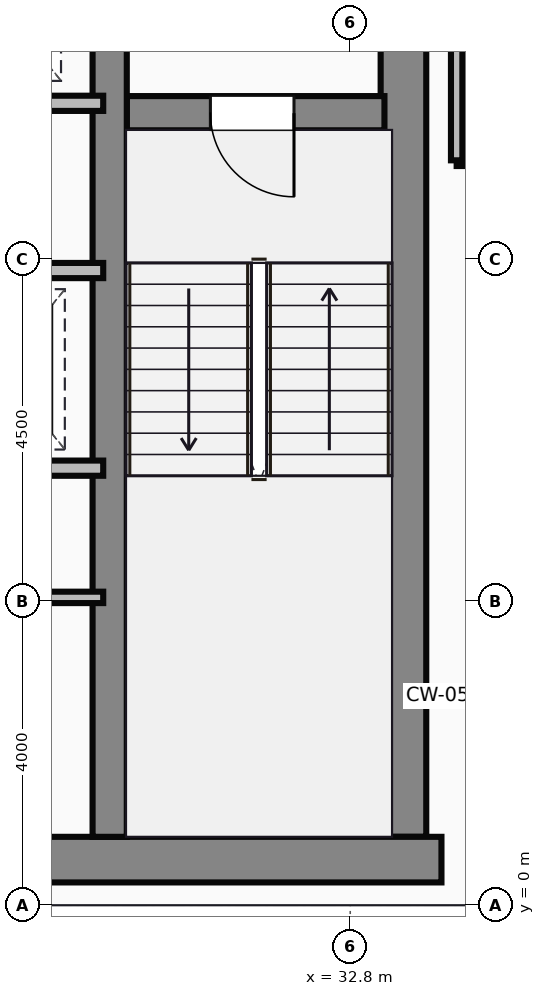
"""IFC4 building model, lengths in metres.
Left out: names, types, materials, properties, quantities, classifications, styles, units other than length and angle.
Written with IfcOpenShell. Run it as: python <this file> out.ifc"""

import sys

from ifc_helpers import new_model, si_unit, direction, frame, frame_2d, origin, place, context, subcontext, project, spatial, rectangle, extrude, source, transform, mapped, element, fill, save


model = new_model("IFC4")
c1 = context("Model", 3, precision=1e-05, world=origin(), true_north=direction((0.0, 1.0)))
c2 = subcontext(c1, "Body", "Model", "MODEL_VIEW")
j1 = project(units=[si_unit("LENGTHUNIT", "METRE"), si_unit("PLANEANGLEUNIT", "RADIAN")], contexts=[c1])
p1 = place(None, origin())
s1 = spatial("IfcSite", under=j1, at=p1, CompositionType="ELEMENT")
p2 = place(p1, origin())
s2 = spatial("IfcBuilding", under=s1, at=p2, CompositionType="ELEMENT")
p3 = place(p2, frame((0.0, 0.0, 244.2)))
s3 = spatial("IfcBuildingStorey", under=s2, at=p3, CompositionType="ELEMENT", Elevation=244.2)
m1 = source(origin(), c2, "Body", "SweptSolid", [
    extrude(rectangle(XDim=29.5, YDim=0.6, at=frame_2d((14.75, 0.0))), origin(), (0.0, 0.0, 1.0), 3.65),
])
p4 = place(p3, frame((4.5, 0.6, 0.0), z_axis=(0.0, 0.0, 1.0), x_axis=(1.0, 0.0, 0.0)))
e1 = element("IfcWall", 1, at=p4, inside=s3, PredefinedType="SHEAR", context=c2, shape_type="MappedRepresentation", body=[
    mapped(m1, transform((0.0, 0.0, 0.0))),
])
m2 = source(origin(), c2, "Body", "SweptSolid", [
    extrude(rectangle(XDim=13.1, YDim=0.6, at=frame_2d((6.55, 0.0))), origin(), (0.0, 0.0, 1.0), 3.65),
])
p5 = place(p3, frame((33.5, 0.9, 0.0), z_axis=(0.0, 0.0, 1.0), x_axis=(0.0, 1.0, 0.0)))
e2 = element("IfcWall", 2, at=p5, inside=s3, PredefinedType="SHEAR", context=c2, shape_type="MappedRepresentation", body=[
    mapped(m2, transform((0.0, 0.0, 0.0))),
])
m3 = source(origin(), c2, "Body", "SweptSolid", [
    extrude(rectangle(XDim=12.5, YDim=0.45, at=frame_2d((6.25, 0.0))), origin(), (0.0, 0.0, 1.0), 3.65),
])
p6 = place(p3, frame((29.635, 0.9, 0.0), z_axis=(0.0, 0.0, 1.0), x_axis=(0.0, 1.0, 0.0)))
e3 = element("IfcWall", 3, at=p6, inside=s3, PredefinedType="SHEAR", context=c2, shape_type="MappedRepresentation", body=[
    mapped(m3, transform((0.0, 0.0, 0.0))),
])
m4 = source(origin(), c2, "Body", "SweptSolid", [
    extrude(rectangle(XDim=3.39, YDim=0.45, at=frame_2d((1.695, 0.0))), origin(), (0.0, 0.0, 1.0), 3.65),
])
p7 = place(p3, frame((29.86, 10.42, 0.0), z_axis=(0.0, 0.0, 1.0), x_axis=(1.0, 0.0, 0.0)))
e4 = element("IfcWall", 4, at=p7, inside=s3, PredefinedType="SHEAR", context=c2, shape_type="MappedRepresentation", body=[
    mapped(m4, transform((0.0, 0.0, 0.0))),
])
p8 = place(p7, frame((1.1, 0.0, 0.0)))
e5 = element("IfcOpeningElement", 5, at=p8, cuts=e4, PredefinedType="OPENING", context=c2, shape_type="SweptSolid", body=[
    extrude(rectangle(XDim=1.1, YDim=2.15, at=frame_2d((0.55, 1.075))), frame((0.0, 0.235, 0.0), z_axis=(0.0, -1.0, 0.0), x_axis=(1.0, 0.0, 0.0)), (0.0, 0.0, 1.0), 0.47),
])
m5 = source(origin(), c2, "Body", "SweptSolid", [
    extrude(rectangle(XDim=8.8, YDim=0.2, at=frame_2d((4.4, 0.0))), origin(), (0.0, 0.0, 1.0), 3.4),
])
p9 = place(p3, frame((20.75, 10.55, 0.0), z_axis=(0.0, 0.0, 1.0), x_axis=(1.0, 0.0, 0.0)))
e6 = element("IfcWall", 6, at=p9, inside=s3, PredefinedType="PARTITIONING", context=c2, shape_type="MappedRepresentation", body=[
    mapped(m5, transform((0.0, 0.0, 0.0))),
])
p10 = place(p9, frame((0.5, 0.0, 0.0)))
e7 = element("IfcOpeningElement", 7, at=p10, cuts=e6, PredefinedType="OPENING", context=c2, shape_type="SweptSolid", body=[
    extrude(rectangle(XDim=1.05, YDim=2.15, at=frame_2d((0.525, 1.075))), frame((0.0, 0.11, 0.0), z_axis=(0.0, -1.0, 0.0), x_axis=(1.0, 0.0, 0.0)), (0.0, 0.0, 1.0), 0.22),
])
p11 = place(p9, frame((2.6, 0.0, 0.0)))
e8 = element("IfcOpeningElement", 8, at=p11, cuts=e6, PredefinedType="OPENING", context=c2, shape_type="SweptSolid", body=[
    extrude(rectangle(XDim=1.05, YDim=2.15, at=frame_2d((0.525, 1.075))), frame((0.0, 0.11, 0.0), z_axis=(0.0, -1.0, 0.0), x_axis=(1.0, 0.0, 0.0)), (0.0, 0.0, 1.0), 0.22),
])
p12 = place(p9, frame((4.7, 0.0, 0.0)))
e9 = element("IfcOpeningElement", 9, at=p12, cuts=e6, PredefinedType="OPENING", context=c2, shape_type="SweptSolid", body=[
    extrude(rectangle(XDim=1.05, YDim=2.15, at=frame_2d((0.525, 1.075))), frame((0.0, 0.11, 0.0), z_axis=(0.0, -1.0, 0.0), x_axis=(1.0, 0.0, 0.0)), (0.0, 0.0, 1.0), 0.22),
])
p13 = place(p9, frame((6.8, 0.0, 0.0)))
e10 = element("IfcOpeningElement", 10, at=p13, cuts=e6, PredefinedType="OPENING", context=c2, shape_type="SweptSolid", body=[
    extrude(rectangle(XDim=1.05, YDim=2.15, at=frame_2d((0.525, 1.075))), frame((0.0, 0.11, 0.0), z_axis=(0.0, -1.0, 0.0), x_axis=(1.0, 0.0, 0.0)), (0.0, 0.0, 1.0), 0.22),
])
m6 = source(origin(), c2, "Body", "SweptSolid", [
    extrude(rectangle(XDim=4.55, YDim=0.2, at=frame_2d((2.275, 0.0))), origin(), (0.0, 0.0, 1.0), 3.4),
])
p14 = place(p3, frame((25.0, 8.35, 0.0), z_axis=(0.0, 0.0, 1.0), x_axis=(1.0, 0.0, 0.0)))
e11 = element("IfcWall", 11, at=p14, inside=s3, PredefinedType="PARTITIONING", context=c2, shape_type="MappedRepresentation", body=[
    mapped(m6, transform((0.0, 0.0, 0.0))),
])
p15 = place(p14, frame((0.5, 0.0, 0.0)))
e12 = element("IfcOpeningElement", 12, at=p15, cuts=e11, PredefinedType="OPENING", context=c2, shape_type="SweptSolid", body=[
    extrude(rectangle(XDim=1.05, YDim=2.15, at=frame_2d((0.525, 1.075))), frame((0.0, 0.11, 0.0), z_axis=(0.0, -1.0, 0.0), x_axis=(1.0, 0.0, 0.0)), (0.0, 0.0, 1.0), 0.22),
])
p16 = place(p14, frame((2.6, 0.0, 0.0)))
e13 = element("IfcOpeningElement", 13, at=p16, cuts=e11, PredefinedType="OPENING", context=c2, shape_type="SweptSolid", body=[
    extrude(rectangle(XDim=1.05, YDim=2.15, at=frame_2d((0.525, 1.075))), frame((0.0, 0.11, 0.0), z_axis=(0.0, -1.0, 0.0), x_axis=(1.0, 0.0, 0.0)), (0.0, 0.0, 1.0), 0.22),
])
p17 = place(p3, frame((25.0, 5.75, 0.0), z_axis=(0.0, 0.0, 1.0), x_axis=(1.0, 0.0, 0.0)))
e14 = element("IfcWall", 14, at=p17, inside=s3, PredefinedType="PARTITIONING", context=c2, shape_type="MappedRepresentation", body=[
    mapped(m6, transform((0.0, 0.0, 0.0))),
])
m7 = source(origin(), c2, "Body", "SweptSolid", [
    extrude(rectangle(XDim=4.55, YDim=0.15, at=frame_2d((2.275, 0.0))), origin(), (0.0, 0.0, 1.0), 3.4),
])
p18 = place(p3, frame((25.0, 4.05, 0.0), z_axis=(0.0, 0.0, 1.0), x_axis=(1.0, 0.0, 0.0)))
e15 = element("IfcWall", 15, at=p18, inside=s3, PredefinedType="PARTITIONING", context=c2, shape_type="MappedRepresentation", body=[
    mapped(m7, transform((0.0, 0.0, 0.0))),
])
m8 = source(origin(), c2, "Body", "SweptSolid", [
    extrude(rectangle(XDim=4.8, YDim=0.15, at=frame_2d((2.4, 0.0))), origin(), (0.0, 0.0, 1.0), 3.4),
])
p19 = place(p3, frame((34.2, 9.8, 0.0), z_axis=(0.0, 0.0, 1.0), x_axis=(1.0, 0.0, 0.0)))
e16 = element("IfcWall", 16, at=p19, inside=s3, PredefinedType="PARTITIONING", context=c2, shape_type="MappedRepresentation", body=[
    mapped(m8, transform((0.0, 0.0, 0.0))),
])
m9 = source(origin(), c2, "Body", "SweptSolid", [
    extrude(rectangle(XDim=4.18, YDim=0.15, at=frame_2d((2.09, 0.0))), origin(), (0.0, 0.0, 1.0), 3.4),
])
p20 = place(p3, frame((34.2, 9.8, 0.0), z_axis=(0.0, 0.0, 1.0), x_axis=(0.0, 1.0, 0.0)))
e17 = element("IfcWall", 17, at=p20, inside=s3, PredefinedType="PARTITIONING", context=c2, shape_type="MappedRepresentation", body=[
    mapped(m9, transform((0.0, 0.0, 0.0))),
])
m10 = source(origin(), c2, "Body", "SweptSolid", [
    extrude(rectangle(XDim=1.1, YDim=2.15, at=frame_2d((0.55, 1.075))), frame((0.0, 0.025, 0.0), z_axis=(0.0, -1.0, 0.0), x_axis=(1.0, 0.0, 0.0)), (0.0, 0.0, 1.0), 0.05),
])
p21 = place(p8, frame((1.1, 0.0, 0.0), z_axis=(0.0, 0.0, 1.0), x_axis=(-1.0, 0.0, 0.0)))
e18 = element("IfcDoor", 18, at=p21, inside=s3, OperationType="SINGLE_SWING_RIGHT", PredefinedType="DOOR", context=c2, shape_type="MappedRepresentation", body=[
    mapped(m10, transform((0.0, 0.0, 0.0))),
])
fill(e5, e18)
save(model, sys.argv[1])
